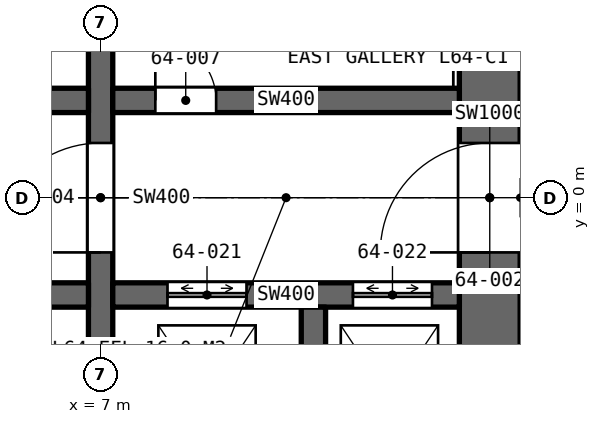
"""IFC4 building model, lengths in metres.
Left out: names, types, materials, properties, quantities, classifications, styles, units other than length and angle.
Written with IfcOpenShell. Run it as: python <this file> out.ifc"""

import sys

from ifc_helpers import new_model, si_unit, direction, frame, frame_2d, origin, place, context, subcontext, project, spatial, rectangle, extrude, element, fill, save


model = new_model("IFC4")
c1 = context("Model", 3, precision=1e-05, world=origin(), true_north=direction((0.0, 1.0)))
c2 = subcontext(c1, "Body", "Model", "MODEL_VIEW")
j1 = project(units=[si_unit("LENGTHUNIT", "METRE"), si_unit("PLANEANGLEUNIT", "RADIAN")], contexts=[c1])
p1 = place(None, origin())
s1 = spatial("IfcSite", under=j1, at=p1, CompositionType="ELEMENT")
p2 = place(p1, origin())
s2 = spatial("IfcBuilding", under=s1, at=p2, CompositionType="ELEMENT")
p3 = place(p2, frame((0.0, 0.0, 288.0)))
s3 = spatial("IfcBuildingStorey", under=s2, at=p3, CompositionType="ELEMENT", Elevation=288.0)
p4 = place(p3, frame((13.4, -8.9, 0.0), z_axis=(0.0, 0.0, 1.0), x_axis=(0.0, 1.0, 0.0)))
e1 = element("IfcWall", 1, at=p4, inside=s3, PredefinedType="SHEAR", context=c2, shape_type="SweptSolid", body=[
    extrude(rectangle(XDim=17.8, YDim=1.0, at=frame_2d((8.9, 0.0))), origin(), (0.0, 0.0, 1.0), 4.2),
])
p5 = place(p4, frame((8.0, 0.0, 0.0)))
e2 = element("IfcOpeningElement", 2, at=p5, cuts=e1, PredefinedType="OPENING", context=c2, shape_type="SweptSolid", body=[
    extrude(rectangle(XDim=1.8, YDim=2.4, at=frame_2d((0.9, 1.2))), frame((0.0, 0.51, 0.0), z_axis=(0.0, -1.0, 0.0), x_axis=(1.0, 0.0, 0.0)), (0.0, 0.0, 1.0), 1.02),
])
p6 = place(p3, frame((7.0, -8.9, 0.0), z_axis=(0.0, 0.0, 1.0), x_axis=(0.0, 1.0, 0.0)))
e3 = element("IfcWall", 3, at=p6, inside=s3, PredefinedType="SHEAR", context=c2, shape_type="SweptSolid", body=[
    extrude(rectangle(XDim=17.8, YDim=0.4, at=frame_2d((8.9, 0.0))), origin(), (0.0, 0.0, 1.0), 4.2),
])
p7 = place(p6, frame((8.0, 0.0, 0.0)))
e4 = element("IfcOpeningElement", 4, at=p7, cuts=e3, PredefinedType="OPENING", context=c2, shape_type="SweptSolid", body=[
    extrude(rectangle(XDim=1.8, YDim=2.4, at=frame_2d((0.9, 1.2))), frame((0.0, 0.21, 0.0), z_axis=(0.0, -1.0, 0.0), x_axis=(1.0, 0.0, 0.0)), (0.0, 0.0, 1.0), 0.42),
])
p8 = place(p3, frame((-6.8, 1.6, 0.0), z_axis=(0.0, 0.0, 1.0), x_axis=(1.0, 0.0, 0.0)))
e5 = element("IfcWall", 5, at=p8, inside=s3, PredefinedType="SHEAR", context=c2, shape_type="SweptSolid", body=[
    extrude(rectangle(XDim=13.6, YDim=0.4, at=frame_2d((6.8, 0.0))), origin(), (0.0, 0.0, 1.0), 4.2),
])
p9 = place(p8, frame((2.365, 0.0, 0.0)))
e6 = element("IfcOpeningElement", 6, at=p9, cuts=e5, PredefinedType="OPENING", context=c2, shape_type="SweptSolid", body=[
    extrude(rectangle(XDim=1.0, YDim=2.4, at=frame_2d((0.5, 1.2))), frame((0.0, 0.21, 0.0), z_axis=(0.0, -1.0, 0.0), x_axis=(1.0, 0.0, 0.0)), (0.0, 0.0, 1.0), 0.42),
])
p10 = place(p8, frame((7.835, 0.0, 0.0)))
e7 = element("IfcOpeningElement", 7, at=p10, cuts=e5, PredefinedType="OPENING", context=c2, shape_type="SweptSolid", body=[
    extrude(rectangle(XDim=1.0, YDim=2.4, at=frame_2d((0.5, 1.2))), frame((0.0, 0.21, 0.0), z_axis=(0.0, -1.0, 0.0), x_axis=(1.0, 0.0, 0.0)), (0.0, 0.0, 1.0), 0.42),
])
p11 = place(p8, frame((11.9, 0.0, 0.0)))
e8 = element("IfcOpeningElement", 8, at=p11, cuts=e5, PredefinedType="OPENING", context=c2, shape_type="SweptSolid", body=[
    extrude(rectangle(XDim=1.0, YDim=2.4, at=frame_2d((0.5, 1.2))), frame((0.0, 0.21, 0.0), z_axis=(0.0, -1.0, 0.0), x_axis=(1.0, 0.0, 0.0)), (0.0, 0.0, 1.0), 0.42),
])
p12 = place(p3, frame((-6.8, -1.6, 0.0), z_axis=(0.0, 0.0, 1.0), x_axis=(1.0, 0.0, 0.0)))
e9 = element("IfcWall", 9, at=p12, inside=s3, PredefinedType="SHEAR", context=c2, shape_type="SweptSolid", body=[
    extrude(rectangle(XDim=13.6, YDim=0.4, at=frame_2d((6.8, 0.0))), origin(), (0.0, 0.0, 1.0), 4.2),
])
p13 = place(p12, frame((11.9, 0.0, 0.0)))
e10 = element("IfcOpeningElement", 10, at=p13, cuts=e9, PredefinedType="OPENING", context=c2, shape_type="SweptSolid", body=[
    extrude(rectangle(XDim=1.0, YDim=2.4, at=frame_2d((0.5, 1.2))), frame((0.0, 0.21, 0.0), z_axis=(0.0, -1.0, 0.0), x_axis=(1.0, 0.0, 0.0)), (0.0, 0.0, 1.0), 0.42),
])
p14 = place(p12, frame((4.5, 0.0, 0.0)))
e11 = element("IfcOpeningElement", 11, at=p14, cuts=e9, PredefinedType="OPENING", context=c2, shape_type="SweptSolid", body=[
    extrude(rectangle(XDim=1.8, YDim=2.4, at=frame_2d((0.9, 1.2))), frame((0.0, 0.21, 0.0), z_axis=(0.0, -1.0, 0.0), x_axis=(1.0, 0.0, 0.0)), (0.0, 0.0, 1.0), 0.42),
])
p15 = place(p3, frame((7.2, 1.6, 0.0), z_axis=(0.0, 0.0, 1.0), x_axis=(1.0, 0.0, 0.0)))
e12 = element("IfcWall", 12, at=p15, inside=s3, PredefinedType="SHEAR", context=c2, shape_type="SweptSolid", body=[
    extrude(rectangle(XDim=5.7, YDim=0.4, at=frame_2d((2.85, 0.0))), origin(), (0.0, 0.0, 1.0), 4.2),
])
p16 = place(p15, frame((0.7, 0.0, 0.0)))
e13 = element("IfcOpeningElement", 13, at=p16, cuts=e12, PredefinedType="OPENING", context=c2, shape_type="SweptSolid", body=[
    extrude(rectangle(XDim=1.0, YDim=2.4, at=frame_2d((0.5, 1.2))), frame((0.0, 0.21, 0.0), z_axis=(0.0, -1.0, 0.0), x_axis=(1.0, 0.0, 0.0)), (0.0, 0.0, 1.0), 0.42),
])
p17 = place(p3, frame((7.2, -1.6, 0.0), z_axis=(0.0, 0.0, 1.0), x_axis=(1.0, 0.0, 0.0)))
e14 = element("IfcWall", 14, at=p17, inside=s3, PredefinedType="SHEAR", context=c2, shape_type="SweptSolid", body=[
    extrude(rectangle(XDim=5.7, YDim=0.4, at=frame_2d((2.85, 0.0))), origin(), (0.0, 0.0, 1.0), 4.2),
])
p18 = place(p17, frame((0.9, 0.0, 0.0)))
e15 = element("IfcOpeningElement", 15, at=p18, cuts=e14, PredefinedType="OPENING", context=c2, shape_type="SweptSolid", body=[
    extrude(rectangle(XDim=1.3, YDim=2.4, at=frame_2d((0.65, 1.2))), frame((0.0, 0.21, 0.0), z_axis=(0.0, -1.0, 0.0), x_axis=(1.0, 0.0, 0.0)), (0.0, 0.0, 1.0), 0.42),
])
p19 = place(p17, frame((3.95, 0.0, 0.0)))
e16 = element("IfcOpeningElement", 16, at=p19, cuts=e14, PredefinedType="OPENING", context=c2, shape_type="SweptSolid", body=[
    extrude(rectangle(XDim=1.3, YDim=2.4, at=frame_2d((0.65, 1.2))), frame((0.0, 0.21, 0.0), z_axis=(0.0, -1.0, 0.0), x_axis=(1.0, 0.0, 0.0)), (0.0, 0.0, 1.0), 0.42),
])
p20 = place(p3, frame((10.5, -4.8, 0.0), z_axis=(0.0, 0.0, 1.0), x_axis=(0.0, 1.0, 0.0)))
e17 = element("IfcWall", 17, at=p20, inside=s3, PredefinedType="SHEAR", context=c2, shape_type="SweptSolid", body=[
    extrude(rectangle(XDim=3.0, YDim=0.4, at=frame_2d((1.5, 0.0))), origin(), (0.0, 0.0, 1.0), 4.2),
])
p21 = place(p5, origin())
e18 = element("IfcDoor", 18, at=p21, inside=s3, OperationType="DOUBLE_DOOR_SINGLE_SWING", PredefinedType="DOOR", context=c2, shape_type="SweptSolid", body=[
    extrude(rectangle(XDim=1.8, YDim=2.4, at=frame_2d((0.9, 1.2))), frame((0.0, 0.025, 0.0), z_axis=(0.0, -1.0, 0.0), x_axis=(1.0, 0.0, 0.0)), (0.0, 0.0, 1.0), 0.05),
])
fill(e2, e18)
p22 = place(p7, origin())
e19 = element("IfcDoor", 19, at=p22, inside=s3, OperationType="DOUBLE_DOOR_SINGLE_SWING", PredefinedType="DOOR", context=c2, shape_type="SweptSolid", body=[
    extrude(rectangle(XDim=1.8, YDim=2.4, at=frame_2d((0.9, 1.2))), frame((0.0, 0.025, 0.0), z_axis=(0.0, -1.0, 0.0), x_axis=(1.0, 0.0, 0.0)), (0.0, 0.0, 1.0), 0.05),
])
fill(e4, e19)
p23 = place(p16, origin())
e20 = element("IfcDoor", 20, at=p23, inside=s3, OperationType="SINGLE_SWING_LEFT", PredefinedType="DOOR", context=c2, shape_type="SweptSolid", body=[
    extrude(rectangle(XDim=1.0, YDim=2.4, at=frame_2d((0.5, 1.2))), frame((0.0, 0.025, 0.0), z_axis=(0.0, -1.0, 0.0), x_axis=(1.0, 0.0, 0.0)), (0.0, 0.0, 1.0), 0.05),
])
fill(e13, e20)
p24 = place(p18, origin())
e21 = element("IfcDoor", 21, at=p24, inside=s3, OperationType="DOUBLE_DOOR_SLIDING", PredefinedType="DOOR", context=c2, shape_type="SweptSolid", body=[
    extrude(rectangle(XDim=1.3, YDim=2.4, at=frame_2d((0.65, 1.2))), frame((0.0, 0.025, 0.0), z_axis=(0.0, -1.0, 0.0), x_axis=(1.0, 0.0, 0.0)), (0.0, 0.0, 1.0), 0.05),
])
fill(e15, e21)
p25 = place(p19, origin())
e22 = element("IfcDoor", 22, at=p25, inside=s3, OperationType="DOUBLE_DOOR_SLIDING", PredefinedType="DOOR", context=c2, shape_type="SweptSolid", body=[
    extrude(rectangle(XDim=1.3, YDim=2.4, at=frame_2d((0.65, 1.2))), frame((0.0, 0.025, 0.0), z_axis=(0.0, -1.0, 0.0), x_axis=(1.0, 0.0, 0.0)), (0.0, 0.0, 1.0), 0.05),
])
fill(e16, e22)
save(model, sys.argv[1])
